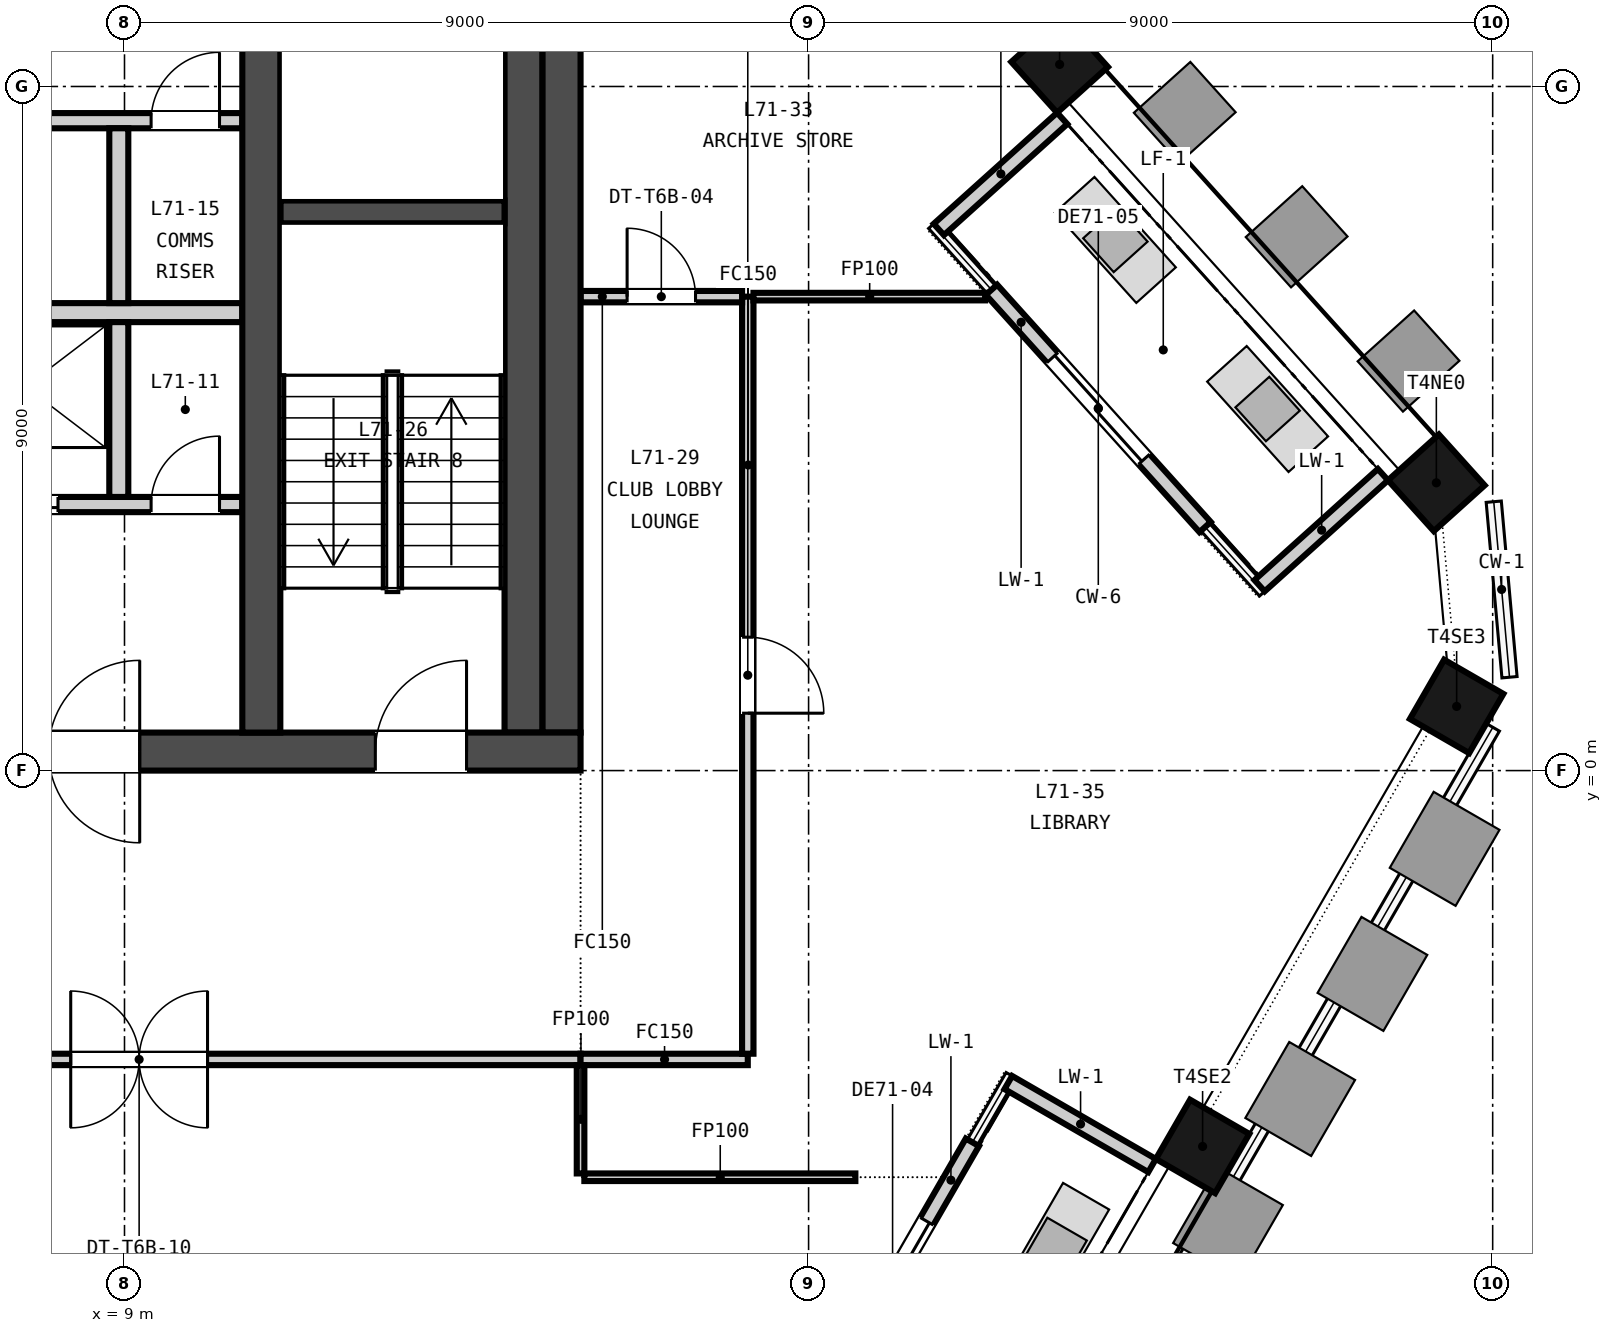
"""IFC4 building model, lengths in metres.
Left out: names, types, materials, properties, quantities, classifications, styles, units other than length and angle.
Written with IfcOpenShell. Run it as: python <this file> out.ifc"""

import sys

from ifc_helpers import new_model, si_unit, direction, frame, frame_2d, origin, origin_2d, place, context, subcontext, project, spatial, rectangle, extrude, element, fill, save


model = new_model("IFC4")
c1 = context("Model", 3, precision=1e-05, world=origin(), true_north=direction((0.0, 1.0)))
c2 = subcontext(c1, "Body", "Model", "MODEL_VIEW")
j1 = project(units=[si_unit("LENGTHUNIT", "METRE"), si_unit("PLANEANGLEUNIT", "RADIAN")], contexts=[c1])
p1 = place(None, origin())
s1 = spatial("IfcSite", under=j1, at=p1, CompositionType="ELEMENT")
p2 = place(p1, origin())
s2 = spatial("IfcBuilding", under=s1, at=p2, CompositionType="ELEMENT")
p3 = place(p2, frame((0.0, 0.0, 279.2)))
s3 = spatial("IfcBuildingStorey", under=s2, at=p3, CompositionType="ELEMENT", Elevation=279.2)
p4 = place(p3, frame((-15.0, 0.25, -0.15), z_axis=(0.0, 0.0, 1.0), x_axis=(1.0, 0.0, 0.0)))
e1 = element("IfcWall", 1, at=p4, inside=s3, PredefinedType="SOLIDWALL", context=c2, shape_type="SweptSolid", body=[
    extrude(rectangle(XDim=30.0, YDim=0.5, at=frame_2d((15.0, 0.0))), origin(), (0.0, 0.0, 1.0), 3.65),
])
p5 = place(p4, frame((5.8, 0.0, 0.15)))
e2 = element("IfcOpeningElement", 2, at=p5, cuts=e1, PredefinedType="OPENING", context=c2, shape_type="SweptSolid", body=[
    extrude(rectangle(XDim=2.4, YDim=2.4, at=frame_2d((1.2, 1.2))), frame((0.0, 0.26, 0.0), z_axis=(0.0, -1.0, 0.0), x_axis=(1.0, 0.0, 0.0)), (0.0, 0.0, 1.0), 0.52),
])
p6 = place(p4, frame((13.8, 0.0, 0.15)))
e3 = element("IfcOpeningElement", 3, at=p6, cuts=e1, PredefinedType="OPENING", context=c2, shape_type="SweptSolid", body=[
    extrude(rectangle(XDim=2.4, YDim=2.4, at=frame_2d((1.2, 1.2))), frame((0.0, 0.26, 0.0), z_axis=(0.0, -1.0, 0.0), x_axis=(1.0, 0.0, 0.0)), (0.0, 0.0, 1.0), 0.52),
])
p7 = place(p4, frame((21.8, 0.0, 0.15)))
e4 = element("IfcOpeningElement", 4, at=p7, cuts=e1, PredefinedType="OPENING", context=c2, shape_type="SweptSolid", body=[
    extrude(rectangle(XDim=2.4, YDim=2.4, at=frame_2d((1.2, 1.2))), frame((0.0, 0.26, 0.0), z_axis=(0.0, -1.0, 0.0), x_axis=(1.0, 0.0, 0.0)), (0.0, 0.0, 1.0), 0.52),
])
p8 = place(p4, frame((1.5, 0.0, 0.15)))
e5 = element("IfcOpeningElement", 5, at=p8, cuts=e1, PredefinedType="OPENING", context=c2, shape_type="SweptSolid", body=[
    extrude(rectangle(XDim=1.2, YDim=2.1, at=frame_2d((0.6, 1.05))), frame((0.0, 0.26, 0.0), z_axis=(0.0, -1.0, 0.0), x_axis=(1.0, 0.0, 0.0)), (0.0, 0.0, 1.0), 0.52),
])
p9 = place(p4, frame((27.3, 0.0, 0.15)))
e6 = element("IfcOpeningElement", 6, at=p9, cuts=e1, PredefinedType="OPENING", context=c2, shape_type="SweptSolid", body=[
    extrude(rectangle(XDim=1.2, YDim=2.1, at=frame_2d((0.6, 1.05))), frame((0.0, 0.26, 0.0), z_axis=(0.0, -1.0, 0.0), x_axis=(1.0, 0.0, 0.0)), (0.0, 0.0, 1.0), 0.52),
])
for number, where, z_axis, x_axis in (
    (7, (14.75, 0.5, -0.15), (0.0, 0.0, 1.0), (0.0, 1.0, 0.0)),
    (8, (10.8, 0.5, -0.15), (0.0, 0.0, 1.0), (0.0, 1.0, 0.0)),
):
    element("IfcWall", number, at=place(p3, frame(where, z_axis=z_axis, x_axis=x_axis)), inside=s3, PredefinedType="SOLIDWALL", context=c2, shape_type="SweptSolid", body=[
        extrude(rectangle(XDim=14.0, YDim=0.5, at=frame_2d((7.0, 0.0))), origin(), (0.0, 0.0, 1.0), 3.65),
    ])
for number, where, z_axis, x_axis in (
    (9, (23.184, -4.945, -0.15), (0.0, 0.0, 1.0), (0.5, 0.866, 0.0)),
    (10, (26.526, 0.844, -0.15), (0.0, 0.0, 1.0), (0.5, 0.866, 0.0)),
    (11, (26.259, 3.786, -0.15), (0.0, 0.0, 1.0), (-0.669, 0.743, 0.0)),
    (12, (21.303, 9.29, -0.15), (0.0, 0.0, 1.0), (-0.669, 0.743, 0.0)),
):
    element("IfcColumn", number, at=place(p3, frame(where, z_axis=z_axis, x_axis=x_axis)), inside=s3, PredefinedType="COLUMN", context=c2, shape_type="SweptSolid", body=[
        extrude(rectangle(XDim=0.9, YDim=0.9, at=origin_2d()), origin(), (0.0, 0.0, 1.0), 3.65),
    ])
p10 = place(p3, frame((18.055, -8.528, 0.0), z_axis=(0.0, 0.0, 1.0), x_axis=(0.49998411664, 0.866034573852, 0.0)))
e13 = element("IfcWall", 13, at=p10, inside=s3, PredefinedType="SOLIDWALL", context=c2, shape_type="SweptSolid", body=[
    extrude(rectangle(XDim=4.2, YDim=0.2, at=frame_2d((2.1, 0.0))), origin(), (0.0, 0.0, 1.0), 2.9),
])
p11 = place(p10, frame((1.2, 0.0, 0.0)))
e14 = element("IfcOpeningElement", 14, at=p11, cuts=e13, PredefinedType="OPENING", context=c2, shape_type="SweptSolid", body=[
    extrude(rectangle(XDim=1.8, YDim=2.4, at=frame_2d((0.9, 1.2))), frame((0.0, 0.11, 0.0), z_axis=(0.0, -1.0, 0.0), x_axis=(1.0, 0.0, 0.0)), (0.0, 0.0, 1.0), 0.22),
])
p12 = place(p3, frame((22.519, -5.196, 0.0), z_axis=(0.0, 0.0, 1.0), x_axis=(-0.866012456841, 0.500022424093, 0.0)))
e15 = element("IfcWall", 15, at=p12, inside=s3, PredefinedType="SOLIDWALL", context=c2, shape_type="SweptSolid", body=[
    extrude(rectangle(XDim=2.184, YDim=0.2, at=frame_2d((1.092, 0.0))), origin(), (0.0, 0.0, 1.0), 3.05),
])
p13 = place(p3, frame((23.217, 3.204, 0.0), z_axis=(0.0, 0.0, 1.0), x_axis=(-0.669138140895, 0.743138041282, 0.0)))
e16 = element("IfcWall", 16, at=p13, inside=s3, PredefinedType="SOLIDWALL", context=c2, shape_type="SweptSolid", body=[
    extrude(rectangle(XDim=4.2, YDim=0.2, at=frame_2d((2.1, 0.0))), origin(), (0.0, 0.0, 1.0), 3.05),
])
p14 = place(p13, frame((1.2, 0.0, 0.0)))
e17 = element("IfcOpeningElement", 17, at=p14, cuts=e16, PredefinedType="OPENING", context=c2, shape_type="SweptSolid", body=[
    extrude(rectangle(XDim=1.8, YDim=2.4, at=frame_2d((0.9, 1.2))), frame((0.0, 0.11, 0.0), z_axis=(0.0, -1.0, 0.0), x_axis=(1.0, 0.0, 0.0)), (0.0, 0.0, 1.0), 0.22),
])
for number, where, z_axis, x_axis in (
    (18, (25.556, 3.894, 0.0), (0.0, 0.0, 1.0), (-0.743, -0.669, 0.0)),
    (19, (21.336, 8.58, 0.0), (0.0, 0.0, 1.0), (-0.743, -0.669, 0.0)),
):
    element("IfcWall", number, at=place(p3, frame(where, z_axis=z_axis, x_axis=x_axis)), inside=s3, PredefinedType="SOLIDWALL", context=c2, shape_type="SweptSolid", body=[
        extrude(rectangle(XDim=2.184, YDim=0.2, at=frame_2d((1.092, 0.0))), origin(), (0.0, 0.0, 1.0), 3.05),
    ])
p15 = place(p3, frame((-10.55, 3.5, 0.0), z_axis=(0.0, 0.0, 1.0), x_axis=(1.0, 0.0, 0.0)))
e20 = element("IfcWall", 20, at=p15, inside=s3, PredefinedType="PARTITIONING", context=c2, shape_type="SweptSolid", body=[
    extrude(rectangle(XDim=21.1, YDim=0.2, at=frame_2d((10.55, 0.0))), origin(), (0.0, 0.0, 1.0), 3.5),
])
p16 = place(p15, frame((0.675, 0.0, 0.0)))
e21 = element("IfcOpeningElement", 21, at=p16, cuts=e20, PredefinedType="OPENING", context=c2, shape_type="SweptSolid", body=[
    extrude(rectangle(XDim=1.2, YDim=2.1, at=frame_2d((0.6, 1.05))), frame((0.0, 0.11, 0.0), z_axis=(0.0, -1.0, 0.0), x_axis=(1.0, 0.0, 0.0)), (0.0, 0.0, 1.0), 0.22),
])
p17 = place(p15, frame((3.475, 0.0, 0.0)))
e22 = element("IfcOpeningElement", 22, at=p17, cuts=e20, PredefinedType="OPENING", context=c2, shape_type="SweptSolid", body=[
    extrude(rectangle(XDim=1.2, YDim=2.1, at=frame_2d((0.6, 1.05))), frame((0.0, 0.11, 0.0), z_axis=(0.0, -1.0, 0.0), x_axis=(1.0, 0.0, 0.0)), (0.0, 0.0, 1.0), 0.22),
])
p18 = place(p15, frame((6.275, 0.0, 0.0)))
e23 = element("IfcOpeningElement", 23, at=p18, cuts=e20, PredefinedType="OPENING", context=c2, shape_type="SweptSolid", body=[
    extrude(rectangle(XDim=1.2, YDim=2.1, at=frame_2d((0.6, 1.05))), frame((0.0, 0.11, 0.0), z_axis=(0.0, -1.0, 0.0), x_axis=(1.0, 0.0, 0.0)), (0.0, 0.0, 1.0), 0.22),
])
p19 = place(p15, frame((9.075, 0.0, 0.0)))
e24 = element("IfcOpeningElement", 24, at=p19, cuts=e20, PredefinedType="OPENING", context=c2, shape_type="SweptSolid", body=[
    extrude(rectangle(XDim=1.2, YDim=2.1, at=frame_2d((0.6, 1.05))), frame((0.0, 0.11, 0.0), z_axis=(0.0, -1.0, 0.0), x_axis=(1.0, 0.0, 0.0)), (0.0, 0.0, 1.0), 0.22),
])
p20 = place(p15, frame((11.875, 0.0, 0.0)))
e25 = element("IfcOpeningElement", 25, at=p20, cuts=e20, PredefinedType="OPENING", context=c2, shape_type="SweptSolid", body=[
    extrude(rectangle(XDim=1.2, YDim=2.1, at=frame_2d((0.6, 1.05))), frame((0.0, 0.11, 0.0), z_axis=(0.0, -1.0, 0.0), x_axis=(1.0, 0.0, 0.0)), (0.0, 0.0, 1.0), 0.22),
])
p21 = place(p15, frame((14.675, 0.0, 0.0)))
e26 = element("IfcOpeningElement", 26, at=p21, cuts=e20, PredefinedType="OPENING", context=c2, shape_type="SweptSolid", body=[
    extrude(rectangle(XDim=1.2, YDim=2.1, at=frame_2d((0.6, 1.05))), frame((0.0, 0.11, 0.0), z_axis=(0.0, -1.0, 0.0), x_axis=(1.0, 0.0, 0.0)), (0.0, 0.0, 1.0), 0.22),
])
p22 = place(p15, frame((17.475, 0.0, 0.0)))
e27 = element("IfcOpeningElement", 27, at=p22, cuts=e20, PredefinedType="OPENING", context=c2, shape_type="SweptSolid", body=[
    extrude(rectangle(XDim=1.2, YDim=2.1, at=frame_2d((0.6, 1.05))), frame((0.0, 0.11, 0.0), z_axis=(0.0, -1.0, 0.0), x_axis=(1.0, 0.0, 0.0)), (0.0, 0.0, 1.0), 0.22),
])
p23 = place(p15, frame((19.9, 0.0, 0.0)))
e28 = element("IfcOpeningElement", 28, at=p23, cuts=e20, PredefinedType="OPENING", context=c2, shape_type="SweptSolid", body=[
    extrude(rectangle(XDim=0.9, YDim=2.1, at=frame_2d((0.45, 1.05))), frame((0.0, 0.11, 0.0), z_axis=(0.0, -1.0, 0.0), x_axis=(1.0, 0.0, 0.0)), (0.0, 0.0, 1.0), 0.22),
])
p24 = place(p3, frame((-10.55, 6.025, 0.0), z_axis=(0.0, 0.0, 1.0), x_axis=(1.0, 0.0, 0.0)))
e29 = element("IfcWall", 29, at=p24, inside=s3, PredefinedType="PARTITIONING", context=c2, shape_type="SweptSolid", body=[
    extrude(rectangle(XDim=21.1, YDim=0.25, at=frame_2d((10.55, 0.0))), origin(), (0.0, 0.0, 1.0), 3.5),
])
p25 = place(p3, frame((-4.125, 8.55, 0.0), z_axis=(0.0, 0.0, 1.0), x_axis=(1.0, 0.0, 0.0)))
e30 = element("IfcWall", 30, at=p25, inside=s3, PredefinedType="PARTITIONING", context=c2, shape_type="SweptSolid", body=[
    extrude(rectangle(XDim=14.675, YDim=0.2, at=frame_2d((7.337, 0.0))), origin(), (0.0, 0.0, 1.0), 3.5),
])
p26 = place(p25, frame((2.438, 0.0, 0.0)))
e31 = element("IfcOpeningElement", 31, at=p26, cuts=e30, PredefinedType="OPENING", context=c2, shape_type="SweptSolid", body=[
    extrude(rectangle(XDim=1.0, YDim=2.1, at=frame_2d((0.5, 1.05))), frame((0.0, 0.11, 0.0), z_axis=(0.0, -1.0, 0.0), x_axis=(1.0, 0.0, 0.0)), (0.0, 0.0, 1.0), 0.22),
])
p27 = place(p25, frame((6.775, 0.0, 0.0)))
e32 = element("IfcOpeningElement", 32, at=p27, cuts=e30, PredefinedType="OPENING", context=c2, shape_type="SweptSolid", body=[
    extrude(rectangle(XDim=1.0, YDim=2.1, at=frame_2d((0.5, 1.05))), frame((0.0, 0.11, 0.0), z_axis=(0.0, -1.0, 0.0), x_axis=(1.0, 0.0, 0.0)), (0.0, 0.0, 1.0), 0.22),
])
p28 = place(p25, frame((10.363, 0.0, 0.0)))
e33 = element("IfcOpeningElement", 33, at=p28, cuts=e30, PredefinedType="OPENING", context=c2, shape_type="SweptSolid", body=[
    extrude(rectangle(XDim=1.0, YDim=2.1, at=frame_2d((0.5, 1.05))), frame((0.0, 0.11, 0.0), z_axis=(0.0, -1.0, 0.0), x_axis=(1.0, 0.0, 0.0)), (0.0, 0.0, 1.0), 0.22),
])
p29 = place(p25, frame((13.475, 0.0, 0.0)))
e34 = element("IfcOpeningElement", 34, at=p29, cuts=e30, PredefinedType="OPENING", context=c2, shape_type="SweptSolid", body=[
    extrude(rectangle(XDim=0.9, YDim=2.1, at=frame_2d((0.45, 1.05))), frame((0.0, 0.11, 0.0), z_axis=(0.0, -1.0, 0.0), x_axis=(1.0, 0.0, 0.0)), (0.0, 0.0, 1.0), 0.22),
])
p30 = place(p3, frame((8.925, 3.6, 0.0), z_axis=(0.0, 0.0, 1.0), x_axis=(0.0, 1.0, 0.0)))
e35 = element("IfcWall", 35, at=p30, inside=s3, PredefinedType="PARTITIONING", context=c2, shape_type="SweptSolid", body=[
    extrude(rectangle(XDim=2.3, YDim=0.25, at=frame_2d((1.15, 0.0))), origin(), (0.0, 0.0, 1.0), 3.5),
])
p31 = place(p3, frame((8.925, 6.15, 0.0), z_axis=(0.0, 0.0, 1.0), x_axis=(0.0, 1.0, 0.0)))
e36 = element("IfcWall", 36, at=p31, inside=s3, PredefinedType="PARTITIONING", context=c2, shape_type="SweptSolid", body=[
    extrude(rectangle(XDim=2.3, YDim=0.25, at=frame_2d((1.15, 0.0))), origin(), (0.0, 0.0, 1.0), 3.5),
])
p32 = place(p3, frame((11.05, 7.35, 0.0), z_axis=(0.0, 0.0, 1.0), x_axis=(1.0, 0.0, 0.0)))
e37 = element("IfcWall", 37, at=p32, inside=s3, PredefinedType="SOLIDWALL", context=c2, shape_type="SweptSolid", body=[
    extrude(rectangle(XDim=2.95, YDim=0.3, at=frame_2d((1.475, 0.0))), origin(), (0.0, 0.0, 1.0), 3.5),
])
p33 = place(p3, frame((14.25, 0.5, 0.0), z_axis=(0.0, 0.0, 1.0), x_axis=(0.0, 1.0, 0.0)))
e38 = element("IfcWall", 38, at=p33, inside=s3, PredefinedType="SOLIDWALL", context=c2, shape_type="SweptSolid", body=[
    extrude(rectangle(XDim=14.0, YDim=0.5, at=frame_2d((7.0, 0.0))), origin(), (0.0, 0.0, 1.0), 3.5),
])
p34 = place(p3, frame((15.0, -3.8, 0.0), z_axis=(0.0, 0.0, 1.0), x_axis=(-1.0, 0.0, 0.0)))
e39 = element("IfcWall", 39, at=p34, inside=s3, PredefinedType="PARTITIONING", context=c2, shape_type="SweptSolid", body=[
    extrude(rectangle(XDim=11.615, YDim=0.15, at=frame_2d((5.808, 0.0))), origin(), (0.0, 0.0, 1.0), 2.751),
])
p35 = place(p34, frame((4.907, 0.0, 0.0)))
e40 = element("IfcOpeningElement", 40, at=p35, cuts=e39, PredefinedType="OPENING", context=c2, shape_type="SweptSolid", body=[
    extrude(rectangle(XDim=1.8, YDim=2.1, at=frame_2d((0.9, 1.05))), frame((0.0, 0.085, 0.0), z_axis=(0.0, -1.0, 0.0), x_axis=(1.0, 0.0, 0.0)), (0.0, 0.0, 1.0), 0.17),
])
p36 = place(p3, frame((17.2, -3.8, 0.0), z_axis=(0.0, 0.0, 1.0), x_axis=(-1.0, 0.0, 0.0)))
e41 = element("IfcWall", 41, at=p36, inside=s3, PredefinedType="PARTITIONING", context=c2, shape_type="SweptSolid", body=[
    extrude(rectangle(XDim=2.2, YDim=0.15, at=frame_2d((1.1, 0.0))), origin(), (0.0, 0.0, 1.0), 2.751),
])
p37 = place(p3, frame((17.2, 6.235, 0.0), z_axis=(0.0, 0.0, 1.0), x_axis=(0.0, -1.0, 0.0)))
e42 = element("IfcWall", 42, at=p37, inside=s3, PredefinedType="PARTITIONING", context=c2, shape_type="SweptSolid", body=[
    extrude(rectangle(XDim=9.96, YDim=0.15, at=frame_2d((4.98, 0.0))), origin(), (0.0, 0.0, 1.0), 2.751),
])
p38 = place(p37, frame((4.48, 0.0, 0.0)))
e43 = element("IfcOpeningElement", 43, at=p38, cuts=e42, PredefinedType="OPENING", context=c2, shape_type="SweptSolid", body=[
    extrude(rectangle(XDim=1.0, YDim=2.1, at=frame_2d((0.5, 1.05))), frame((0.0, 0.085, 0.0), z_axis=(0.0, -1.0, 0.0), x_axis=(1.0, 0.0, 0.0)), (0.0, 0.0, 1.0), 0.17),
])
p39 = place(p3, frame((15.0, 6.235, 0.0), z_axis=(0.0, 0.0, 1.0), x_axis=(1.0, 0.0, 0.0)))
e44 = element("IfcWall", 44, at=p39, inside=s3, PredefinedType="PARTITIONING", context=c2, shape_type="SweptSolid", body=[
    extrude(rectangle(XDim=2.125, YDim=0.15, at=frame_2d((1.062, 0.0))), origin(), (0.0, 0.0, 1.0), 2.751),
])
p40 = place(p39, frame((0.613, 0.0, 0.0)))
e45 = element("IfcOpeningElement", 45, at=p40, cuts=e44, PredefinedType="OPENING", context=c2, shape_type="SweptSolid", body=[
    extrude(rectangle(XDim=0.9, YDim=2.1, at=frame_2d((0.45, 1.05))), frame((0.0, 0.085, 0.0), z_axis=(0.0, -1.0, 0.0), x_axis=(1.0, 0.0, 0.0)), (0.0, 0.0, 1.0), 0.17),
])
p41 = place(p3, frame((17.275, 6.235, 0.0), z_axis=(0.0, 0.0, 1.0), x_axis=(0.999999971117, 0.000240346091, 0.0)))
e46 = element("IfcWall", 46, at=p41, inside=s3, PredefinedType="PARTITIONING", context=c2, shape_type="SweptSolid", body=[
    extrude(rectangle(XDim=3.047, YDim=0.1, at=frame_2d((1.524, 0.0))), origin(), (0.0, 0.0, 1.0), 2.751),
])
p42 = place(p3, frame((15.05, -5.35, 0.0), z_axis=(0.0, 0.0, 1.0), x_axis=(1.0, 0.0, 0.0)))
e47 = element("IfcWall", 47, at=p42, inside=s3, PredefinedType="PARTITIONING", context=c2, shape_type="SweptSolid", body=[
    extrude(rectangle(XDim=3.565, YDim=0.1, at=frame_2d((1.783, 0.0))), origin(), (0.0, 0.0, 1.0), 2.751),
])
p43 = place(p3, frame((15.0, -5.3, 0.0), z_axis=(0.0, 0.0, 1.0), x_axis=(0.0, 1.0, 0.0)))
e48 = element("IfcWall", 48, at=p43, inside=s3, PredefinedType="PARTITIONING", context=c2, shape_type="SweptSolid", body=[
    extrude(rectangle(XDim=1.425, YDim=0.1, at=frame_2d((0.712, 0.0))), origin(), (0.0, 0.0, 1.0), 2.751),
])
p44 = place(p11, origin())
e49 = element("IfcDoor", 49, at=p44, inside=s3, OperationType="SINGLE_SWING_LEFT", PredefinedType="DOOR", context=c2, shape_type="SweptSolid", body=[
    extrude(rectangle(XDim=1.8, YDim=2.4, at=frame_2d((0.9, 1.2))), frame((0.0, 0.025, 0.0), z_axis=(0.0, -1.0, 0.0), x_axis=(1.0, 0.0, 0.0)), (0.0, 0.0, 1.0), 0.05),
])
fill(e14, e49)
p45 = place(p14, origin())
e50 = element("IfcDoor", 50, at=p45, inside=s3, OperationType="SINGLE_SWING_LEFT", PredefinedType="DOOR", context=c2, shape_type="SweptSolid", body=[
    extrude(rectangle(XDim=1.8, YDim=2.4, at=frame_2d((0.9, 1.2))), frame((0.0, 0.025, 0.0), z_axis=(0.0, -1.0, 0.0), x_axis=(1.0, 0.0, 0.0)), (0.0, 0.0, 1.0), 0.05),
])
fill(e17, e50)
p46 = place(p22, origin())
e51 = element("IfcDoor", 51, at=p46, inside=s3, OperationType="DOUBLE_DOOR_SLIDING", PredefinedType="DOOR", context=c2, shape_type="SweptSolid", body=[
    extrude(rectangle(XDim=1.2, YDim=2.1, at=frame_2d((0.6, 1.05))), frame((0.0, 0.025, 0.0), z_axis=(0.0, -1.0, 0.0), x_axis=(1.0, 0.0, 0.0)), (0.0, 0.0, 1.0), 0.05),
])
fill(e27, e51)
p47 = place(p23, origin())
e52 = element("IfcDoor", 52, at=p47, inside=s3, OperationType="SINGLE_SWING_RIGHT", PredefinedType="DOOR", context=c2, shape_type="SweptSolid", body=[
    extrude(rectangle(XDim=0.9, YDim=2.1, at=frame_2d((0.45, 1.05))), frame((0.0, 0.025, 0.0), z_axis=(0.0, -1.0, 0.0), x_axis=(1.0, 0.0, 0.0)), (0.0, 0.0, 1.0), 0.05),
])
fill(e28, e52)
p48 = place(p29, origin())
e53 = element("IfcDoor", 53, at=p48, inside=s3, OperationType="SINGLE_SWING_RIGHT", PredefinedType="DOOR", context=c2, shape_type="SweptSolid", body=[
    extrude(rectangle(XDim=0.9, YDim=2.1, at=frame_2d((0.45, 1.05))), frame((0.0, 0.025, 0.0), z_axis=(0.0, -1.0, 0.0), x_axis=(1.0, 0.0, 0.0)), (0.0, 0.0, 1.0), 0.05),
])
fill(e34, e53)
p49 = place(p7, origin())
e54 = element("IfcDoor", 54, at=p49, inside=s3, OperationType="DOUBLE_DOOR_DOUBLE_SWING", PredefinedType="DOOR", context=c2, shape_type="SweptSolid", body=[
    extrude(rectangle(XDim=2.4, YDim=2.4, at=frame_2d((1.2, 1.2))), frame((0.0, 0.025, 0.0), z_axis=(0.0, -1.0, 0.0), x_axis=(1.0, 0.0, 0.0)), (0.0, 0.0, 1.0), 0.05),
])
fill(e4, e54)
p50 = place(p9, origin())
e55 = element("IfcDoor", 55, at=p50, inside=s3, OperationType="SINGLE_SWING_RIGHT", PredefinedType="DOOR", context=c2, shape_type="SweptSolid", body=[
    extrude(rectangle(XDim=1.2, YDim=2.1, at=frame_2d((0.6, 1.05))), frame((0.0, 0.025, 0.0), z_axis=(0.0, -1.0, 0.0), x_axis=(1.0, 0.0, 0.0)), (0.0, 0.0, 1.0), 0.05),
])
fill(e6, e55)
p51 = place(p40, origin())
e56 = element("IfcDoor", 56, at=p51, inside=s3, OperationType="SINGLE_SWING_LEFT", PredefinedType="DOOR", context=c2, shape_type="SweptSolid", body=[
    extrude(rectangle(XDim=0.9, YDim=2.1, at=frame_2d((0.45, 1.05))), frame((0.0, 0.025, 0.0), z_axis=(0.0, -1.0, 0.0), x_axis=(1.0, 0.0, 0.0)), (0.0, 0.0, 1.0), 0.05),
])
fill(e45, e56)
p52 = place(p38, origin())
e57 = element("IfcDoor", 57, at=p52, inside=s3, OperationType="SINGLE_SWING_RIGHT", PredefinedType="DOOR", context=c2, shape_type="SweptSolid", body=[
    extrude(rectangle(XDim=1.0, YDim=2.1, at=frame_2d((0.5, 1.05))), frame((0.0, 0.025, 0.0), z_axis=(0.0, -1.0, 0.0), x_axis=(1.0, 0.0, 0.0)), (0.0, 0.0, 1.0), 0.05),
])
fill(e43, e57)
p53 = place(p35, origin())
e58 = element("IfcDoor", 58, at=p53, inside=s3, OperationType="DOUBLE_DOOR_DOUBLE_SWING", PredefinedType="DOOR", context=c2, shape_type="SweptSolid", body=[
    extrude(rectangle(XDim=1.8, YDim=2.1, at=frame_2d((0.9, 1.05))), frame((0.0, 0.025, 0.0), z_axis=(0.0, -1.0, 0.0), x_axis=(1.0, 0.0, 0.0)), (0.0, 0.0, 1.0), 0.05),
])
fill(e40, e58)
save(model, sys.argv[1])
